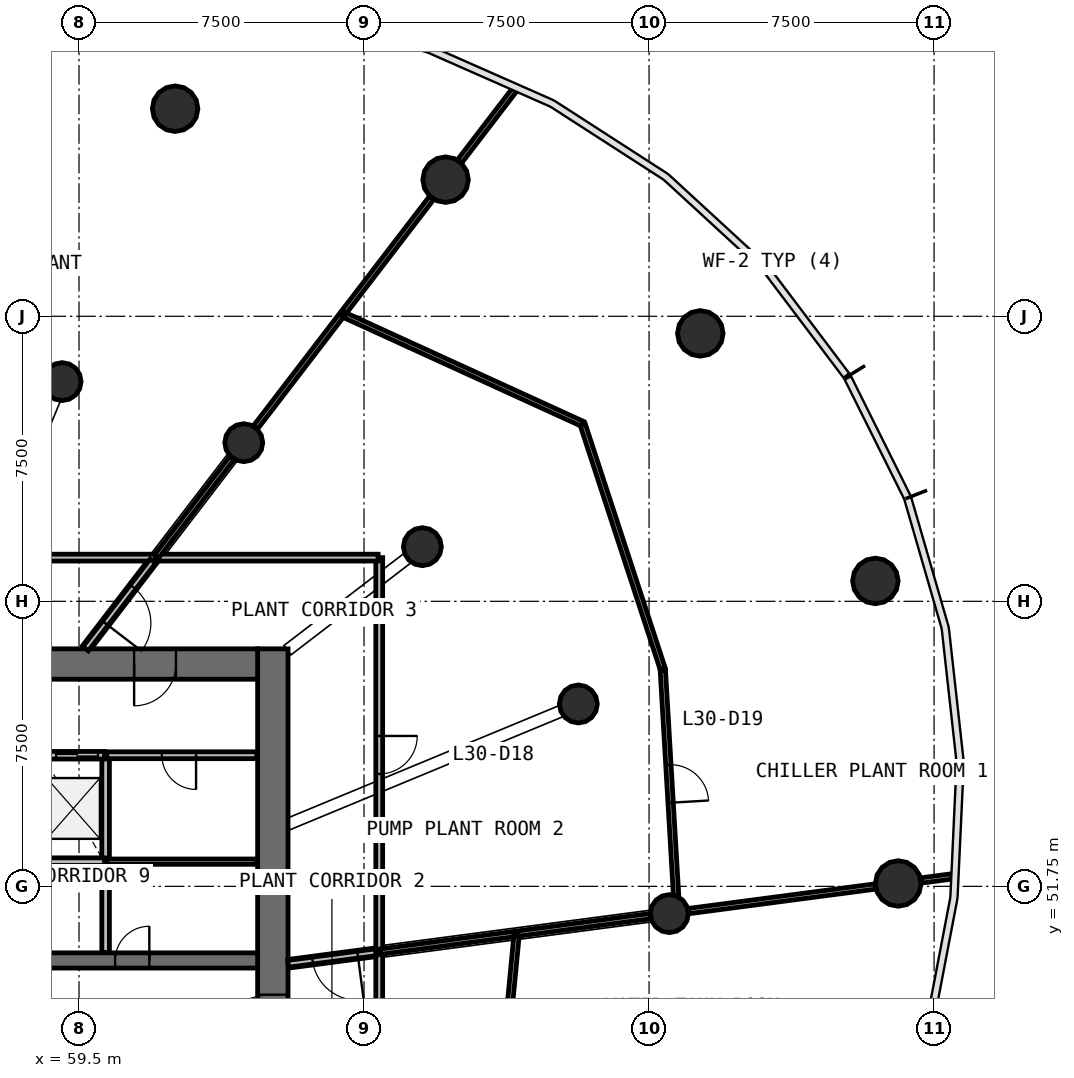
"""IFC4 building model, lengths in metres.
Left out: names, types, materials, properties, quantities, classifications, styles, units other than length and angle.
Written with IfcOpenShell. Run it as: python <this file> out.ifc"""

import sys

from ifc_helpers import new_model, si_unit, direction, frame, frame_2d, origin, origin_2d, place, context, subcontext, project, spatial, rectangle, circle, extrude, source, transform, mapped, element, fill, save


model = new_model("IFC4")
c1 = context("Model", 3, precision=1e-05, world=origin(), true_north=direction((0.0, 1.0)))
c2 = subcontext(c1, "Body", "Model", "MODEL_VIEW")
j1 = project(units=[si_unit("LENGTHUNIT", "METRE"), si_unit("PLANEANGLEUNIT", "RADIAN")], contexts=[c1])
p1 = place(None, origin())
s1 = spatial("IfcSite", under=j1, at=p1, CompositionType="ELEMENT")
p2 = place(p1, origin())
s2 = spatial("IfcBuilding", under=s1, at=p2, CompositionType="ELEMENT")
p3 = place(p2, frame((0.0, 0.0, 129.0)))
s3 = spatial("IfcBuildingStorey", under=s2, at=p3, CompositionType="ELEMENT", Elevation=129.0)
p4 = place(p3, frame((64.6, 38.0, 0.0), z_axis=(0.0, 0.0, 1.0), x_axis=(0.0, 1.0, 0.0)))
e1 = element("IfcWall", 1, at=p4, inside=s3, PredefinedType="SHEAR", context=c2, shape_type="SweptSolid", body=[
    extrude(rectangle(XDim=20.0, YDim=0.8, at=frame_2d((10.0, 0.0))), origin(), (0.0, 0.0, 1.0), 4.1),
])
p5 = place(p4, frame((9.1, 0.0, 0.0)))
e2 = element("IfcOpeningElement", 2, at=p5, cuts=e1, PredefinedType="OPENING", context=c2, shape_type="SweptSolid", body=[
    extrude(rectangle(XDim=1.8, YDim=2.1, at=frame_2d((0.9, 1.05))), frame((0.0, 0.41, 0.0), z_axis=(0.0, -1.0, 0.0), x_axis=(1.0, 0.0, 0.0)), (0.0, 0.0, 1.0), 0.82),
])
p6 = place(p3, frame((64.2, 57.6, 0.0), z_axis=(0.0, 0.0, 1.0), x_axis=(-1.0, 0.0, 0.0)))
e3 = element("IfcWall", 3, at=p6, inside=s3, PredefinedType="SHEAR", context=c2, shape_type="SweptSolid", body=[
    extrude(rectangle(XDim=24.4, YDim=0.8, at=frame_2d((12.2, 0.0))), origin(), (0.0, 0.0, 1.0), 4.1),
])
p7 = place(p6, frame((21.65, 0.0, 0.0)))
e4 = element("IfcOpeningElement", 4, at=p7, cuts=e3, PredefinedType="OPENING", context=c2, shape_type="SweptSolid", body=[
    extrude(rectangle(XDim=1.1, YDim=2.1, at=frame_2d((0.55, 1.05))), frame((0.0, 0.41, 0.0), z_axis=(0.0, -1.0, 0.0), x_axis=(1.0, 0.0, 0.0)), (0.0, 0.0, 1.0), 0.82),
])
p8 = place(p6, frame((2.15, 0.0, 0.0)))
e5 = element("IfcOpeningElement", 5, at=p8, cuts=e3, PredefinedType="OPENING", context=c2, shape_type="SweptSolid", body=[
    extrude(rectangle(XDim=1.1, YDim=2.1, at=frame_2d((0.55, 1.05))), frame((0.0, 0.41, 0.0), z_axis=(0.0, -1.0, 0.0), x_axis=(1.0, 0.0, 0.0)), (0.0, 0.0, 1.0), 0.82),
])
p9 = place(p3, frame((39.8, 49.8, 0.0), z_axis=(0.0, 0.0, 1.0), x_axis=(1.0, 0.0, 0.0)))
e6 = element("IfcWall", 6, at=p9, inside=s3, PredefinedType="SHEAR", context=c2, shape_type="SweptSolid", body=[
    extrude(rectangle(XDim=24.4, YDim=0.4, at=frame_2d((12.2, 0.0))), origin(), (0.0, 0.0, 1.0), 4.1),
])
p10 = place(p9, frame((1.1, 0.0, 0.0)))
e7 = element("IfcOpeningElement", 7, at=p10, cuts=e6, PredefinedType="OPENING", context=c2, shape_type="SweptSolid", body=[
    extrude(rectangle(XDim=1.8, YDim=2.4, at=frame_2d((0.9, 1.2))), frame((0.0, 0.21, 0.0), z_axis=(0.0, -1.0, 0.0), x_axis=(1.0, 0.0, 0.0)), (0.0, 0.0, 1.0), 0.42),
])
p11 = place(p9, frame((20.65, 0.0, 0.0)))
e8 = element("IfcOpeningElement", 8, at=p11, cuts=e6, PredefinedType="OPENING", context=c2, shape_type="SweptSolid", body=[
    extrude(rectangle(XDim=0.9, YDim=2.1, at=frame_2d((0.45, 1.05))), frame((0.0, 0.21, 0.0), z_axis=(0.0, -1.0, 0.0), x_axis=(1.0, 0.0, 0.0)), (0.0, 0.0, 1.0), 0.42),
])
p12 = place(p9, frame((11.85, 0.0, 0.0)))
e9 = element("IfcOpeningElement", 9, at=p12, cuts=e6, PredefinedType="OPENING", context=c2, shape_type="SweptSolid", body=[
    extrude(rectangle(XDim=0.9, YDim=2.1, at=frame_2d((0.45, 1.05))), frame((0.0, 0.21, 0.0), z_axis=(0.0, -1.0, 0.0), x_axis=(1.0, 0.0, 0.0)), (0.0, 0.0, 1.0), 0.42),
])
m1 = source(origin(), c2, "Body", "SweptSolid", [
    extrude(circle(Radius=0.6, at=origin_2d()), origin(), (0.0, 0.0, 1.0), 3.78),
])
for number, where, z_axis, x_axis in (
    (10, (81.056, 51.825, 0.0), (0.0, 0.0, 1.0), (1.0, 0.0, 0.0)),
    (11, (80.456, 59.787, 0.0), (0.0, 0.0, 1.0), (1.0, 0.0, 0.0)),
    (12, (75.848, 66.299, 0.0), (0.0, 0.0, 1.0), (1.0, 0.0, 0.0)),
    (13, (69.146, 70.345, 0.0), (0.0, 0.0, 1.0), (1.0, 0.0, 0.0)),
    (14, (62.029, 72.212, 0.0), (0.0, 0.0, 1.0), (1.0, 0.0, 0.0)),
):
    element("IfcColumn", number, at=place(p3, frame(where, z_axis=z_axis, x_axis=x_axis)), inside=s3, PredefinedType="COLUMN", context=c2, shape_type="MappedRepresentation", body=[
        mapped(m1, transform((0.0, 0.0, 0.0), scale=1.0)),
    ])
m2 = source(origin(), c2, "Body", "SweptSolid", [
    extrude(circle(Radius=0.5, at=origin_2d()), origin(), (0.0, 0.0, 1.0), 3.78),
])
for number, where, z_axis, x_axis in (
    (15, (75.034, 51.032, 0.0), (0.0, 0.0, 1.0), (1.0, 0.0, 0.0)),
    (16, (72.639, 56.549, 0.0), (0.0, 0.0, 1.0), (1.0, 0.0, 0.0)),
    (17, (68.535, 60.688, 0.0), (0.0, 0.0, 1.0), (1.0, 0.0, 0.0)),
    (18, (63.835, 63.424, 0.0), (0.0, 0.0, 1.0), (1.0, 0.0, 0.0)),
    (19, (59.055, 65.031, 0.0), (0.0, 0.0, 1.0), (1.0, 0.0, 0.0)),
):
    element("IfcColumn", number, at=place(p3, frame(where, z_axis=z_axis, x_axis=x_axis)), inside=s3, PredefinedType="COLUMN", context=c2, shape_type="MappedRepresentation", body=[
        mapped(m2, transform((0.0, 0.0, 0.0), scale=1.0)),
    ])
p13 = place(p3, frame((60.2, 52.4, 0.0), z_axis=(0.0, 0.0, 1.0), x_axis=(0.0, 1.0, 0.0)))
e20 = element("IfcWall", 20, at=p13, inside=s3, PredefinedType="SOLIDWALL", context=c2, shape_type="SweptSolid", body=[
    extrude(rectangle(XDim=2.8, YDim=0.2, at=frame_2d((1.4, 0.0))), origin(), (0.0, 0.0, 1.0), 3.78),
])
p14 = place(p3, frame((60.2, 50.01, 0.0), z_axis=(0.0, 0.0, 1.0), x_axis=(0.0, 1.0, 0.0)))
e21 = element("IfcWall", 21, at=p14, inside=s3, PredefinedType="SOLIDWALL", context=c2, shape_type="SweptSolid", body=[
    extrude(rectangle(XDim=2.36, YDim=0.2, at=frame_2d((1.18, 0.0))), origin(), (0.0, 0.0, 1.0), 3.78),
])
p15 = place(p3, frame((60.17, 52.4, 0.0), z_axis=(0.0, 0.0, 1.0), x_axis=(-1.0, 0.0, 0.0)))
e22 = element("IfcWall", 22, at=p15, inside=s3, PredefinedType="SOLIDWALL", context=c2, shape_type="SweptSolid", body=[
    extrude(rectangle(XDim=1.64, YDim=0.2, at=frame_2d((0.82, 0.0))), origin(), (0.0, 0.0, 1.0), 3.78),
])
p16 = place(p3, frame((60.17, 55.2, 0.0), z_axis=(0.0, 0.0, 1.0), x_axis=(-1.0, 0.0, 0.0)))
e23 = element("IfcWall", 23, at=p16, inside=s3, PredefinedType="SOLIDWALL", context=c2, shape_type="SweptSolid", body=[
    extrude(rectangle(XDim=1.64, YDim=0.2, at=frame_2d((0.82, 0.0))), origin(), (0.0, 0.0, 1.0), 3.78),
])
p17 = place(p16, frame((0.17, 0.0, 0.0)))
e24 = element("IfcOpeningElement", 24, at=p17, cuts=e23, PredefinedType="OPENING", context=c2, shape_type="SweptSolid", body=[
    extrude(rectangle(XDim=1.1, YDim=2.1, at=frame_2d((0.55, 1.05))), frame((0.0, 0.11, 0.0), z_axis=(0.0, -1.0, 0.0), x_axis=(1.0, 0.0, 0.0)), (0.0, 0.0, 1.0), 0.22),
])
p18 = place(p3, frame((67.4, 50.027, 0.0), z_axis=(0.0, 0.0, 1.0), x_axis=(0.0, -1.0, 0.0)))
e25 = element("IfcWall", 25, at=p18, inside=s3, PredefinedType="PARTITIONING", context=c2, shape_type="SweptSolid", body=[
    extrude(rectangle(XDim=13.24, YDim=0.18, at=frame_2d((6.62, 0.0))), origin(), (0.0, 0.0, 1.0), 2.58),
])
p19 = place(p18, frame((6.19, 0.0, 0.0)))
e26 = element("IfcOpeningElement", 26, at=p19, cuts=e25, PredefinedType="OPENING", context=c2, shape_type="SweptSolid", body=[
    extrude(rectangle(XDim=1.0, YDim=2.1, at=frame_2d((0.5, 1.05))), frame((0.0, 0.1, 0.0), z_axis=(0.0, -1.0, 0.0), x_axis=(1.0, 0.0, 0.0)), (0.0, 0.0, 1.0), 0.2),
])
p20 = place(p3, frame((50.397, 60.4, 0.0), z_axis=(0.0, 0.0, 1.0), x_axis=(1.0, 0.0, 0.0)))
e27 = element("IfcWall", 27, at=p20, inside=s3, PredefinedType="PARTITIONING", context=c2, shape_type="SweptSolid", body=[
    extrude(rectangle(XDim=11.117, YDim=0.18, at=frame_2d((5.559, 0.0))), origin(), (0.0, 0.0, 1.0), 2.58),
])
p21 = place(p20, frame((5.067, 0.0, 0.0)))
e28 = element("IfcOpeningElement", 28, at=p21, cuts=e27, PredefinedType="OPENING", context=c2, shape_type="SweptSolid", body=[
    extrude(rectangle(XDim=1.0, YDim=2.1, at=frame_2d((0.5, 1.05))), frame((0.0, 0.1, 0.0), z_axis=(0.0, -1.0, 0.0), x_axis=(1.0, 0.0, 0.0)), (0.0, 0.0, 1.0), 0.2),
])
p22 = place(p3, frame((67.4, 60.4, 0.0), z_axis=(0.0, 0.0, 1.0), x_axis=(0.0, -1.0, 0.0)))
e29 = element("IfcWall", 29, at=p22, inside=s3, PredefinedType="PARTITIONING", context=c2, shape_type="SweptSolid", body=[
    extrude(rectangle(XDim=10.343, YDim=0.18, at=frame_2d((5.171, 0.0))), origin(), (0.0, 0.0, 1.0), 2.58),
])
p23 = place(p22, frame((4.693, 0.0, 0.0)))
e30 = element("IfcOpeningElement", 30, at=p23, cuts=e29, PredefinedType="OPENING", context=c2, shape_type="SweptSolid", body=[
    extrude(rectangle(XDim=1.0, YDim=2.1, at=frame_2d((0.5, 1.05))), frame((0.0, 0.1, 0.0), z_axis=(0.0, -1.0, 0.0), x_axis=(1.0, 0.0, 0.0)), (0.0, 0.0, 1.0), 0.2),
])
p24 = place(p3, frame((67.37, 60.4, 0.0), z_axis=(0.0, 0.0, 1.0), x_axis=(-1.0, 0.0, 0.0)))
e31 = element("IfcWall", 31, at=p24, inside=s3, PredefinedType="PARTITIONING", context=c2, shape_type="SweptSolid", body=[
    extrude(rectangle(XDim=5.825, YDim=0.18, at=frame_2d((2.913, 0.0))), origin(), (0.0, 0.0, 1.0), 2.58),
])
p25 = place(p3, frame((64.18, 55.2, 0.0), z_axis=(0.0, 0.0, 1.0), x_axis=(-1.0, 0.0, 0.0)))
e32 = element("IfcWall", 32, at=p25, inside=s3, PredefinedType="PARTITIONING", context=c2, shape_type="SweptSolid", body=[
    extrude(rectangle(XDim=3.95, YDim=0.18, at=frame_2d((1.975, 0.0))), origin(), (0.0, 0.0, 1.0), 3.78),
])
p26 = place(p25, frame((1.6, 0.0, 0.0)))
e33 = element("IfcOpeningElement", 33, at=p26, cuts=e32, PredefinedType="OPENING", context=c2, shape_type="SweptSolid", body=[
    extrude(rectangle(XDim=0.9, YDim=2.1, at=frame_2d((0.45, 1.05))), frame((0.0, 0.1, 0.0), z_axis=(0.0, -1.0, 0.0), x_axis=(1.0, 0.0, 0.0)), (0.0, 0.0, 1.0), 0.2),
])
p27 = place(p3, frame((61.446, 60.31, 0.0), z_axis=(0.0, 0.0, 1.0), x_axis=(-0.608737787706, -0.793371480341, 0.0)))
e34 = element("IfcWall", 34, at=p27, inside=s3, PredefinedType="PARTITIONING", context=c2, shape_type="SweptSolid", body=[
    extrude(rectangle(XDim=2.912, YDim=0.18, at=frame_2d((1.456, 0.0))), origin(), (0.0, 0.0, 1.0), 2.58),
])
p28 = place(p27, frame((0.862, 0.0, 0.0)))
e35 = element("IfcOpeningElement", 35, at=p28, cuts=e34, PredefinedType="OPENING", context=c2, shape_type="SweptSolid", body=[
    extrude(rectangle(XDim=1.2, YDim=2.1, at=frame_2d((0.6, 1.05))), frame((0.0, 0.1, 0.0), z_axis=(0.0, -1.0, 0.0), x_axis=(1.0, 0.0, 0.0)), (0.0, 0.0, 1.0), 0.2),
])
p29 = place(p3, frame((67.31, 50.016, 0.0), z_axis=(0.0, 0.0, 1.0), x_axis=(-0.991440737811, -0.130557509967, 0.0)))
e36 = element("IfcWall", 36, at=p29, inside=s3, PredefinedType="PARTITIONING", context=c2, shape_type="SweptSolid", body=[
    extrude(rectangle(XDim=2.33, YDim=0.18, at=frame_2d((1.165, 0.0))), origin(), (0.0, 0.0, 1.0), 2.58),
])
p30 = place(p29, frame((0.48, 0.0, 0.0)))
e37 = element("IfcOpeningElement", 37, at=p30, cuts=e36, PredefinedType="OPENING", context=c2, shape_type="SweptSolid", body=[
    extrude(rectangle(XDim=1.2, YDim=2.1, at=frame_2d((0.6, 1.05))), frame((0.0, 0.1, 0.0), z_axis=(0.0, -1.0, 0.0), x_axis=(1.0, 0.0, 0.0)), (0.0, 0.0, 1.0), 0.2),
])
p31 = place(p3, frame((72.748, 63.92, 0.0), z_axis=(0.0, 0.0, 1.0), x_axis=(-0.909542442832, 0.415611049765, 0.0)))
e38 = element("IfcWall", 38, at=p31, inside=s3, PredefinedType="PARTITIONING", context=c2, shape_type="SweptSolid", body=[
    extrude(rectangle(XDim=6.945, YDim=0.14, at=frame_2d((3.473, 0.0))), origin(), (0.0, 0.0, 1.0), 2.58),
])
p32 = place(p3, frame((74.86, 57.469, 0.0), z_axis=(0.0, 0.0, 1.0), x_axis=(-0.311205759701, 0.950342556728, 0.0)))
e39 = element("IfcWall", 39, at=p32, inside=s3, PredefinedType="PARTITIONING", context=c2, shape_type="SweptSolid", body=[
    extrude(rectangle(XDim=6.759, YDim=0.14, at=frame_2d((3.379, 0.0))), origin(), (0.0, 0.0, 1.0), 2.58),
])
p33 = place(p3, frame((74.862, 57.439, 0.0), z_axis=(0.0, 0.0, 1.0), x_axis=(0.058847201185, -0.998267001815, 0.0)))
e40 = element("IfcWall", 40, at=p33, inside=s3, PredefinedType="PARTITIONING", context=c2, shape_type="SweptSolid", body=[
    extrude(rectangle(XDim=5.945, YDim=0.14, at=frame_2d((2.973, 0.0))), origin(), (0.0, 0.0, 1.0), 2.58),
])
p34 = place(p33, frame((2.495, 0.0, 0.0)))
e41 = element("IfcOpeningElement", 41, at=p34, cuts=e40, PredefinedType="OPENING", context=c2, shape_type="SweptSolid", body=[
    extrude(rectangle(XDim=1.0, YDim=2.1, at=frame_2d((0.5, 1.05))), frame((0.0, 0.08, 0.0), z_axis=(0.0, -1.0, 0.0), x_axis=(1.0, 0.0, 0.0)), (0.0, 0.0, 1.0), 0.16),
])
p35 = place(p3, frame((70.542, 45.559, 0.0), z_axis=(0.0, 0.0, 1.0), x_axis=(0.095688058523, 0.995411369965, 0.0)))
e42 = element("IfcWall", 42, at=p35, inside=s3, PredefinedType="PARTITIONING", context=c2, shape_type="SweptSolid", body=[
    extrude(rectangle(XDim=4.968, YDim=0.14, at=frame_2d((2.484, 0.0))), origin(), (0.0, 0.0, 1.0), 2.58),
])
p36 = place(p3, frame((75.534, 51.098, 0.0), z_axis=(0.0, 0.0, 1.0), x_axis=(0.991443414541, 0.130537181533, 0.0)))
e43 = element("IfcWall", 43, at=p36, inside=s3, PredefinedType="PARTITIONING", context=c2, shape_type="SweptSolid", body=[
    extrude(rectangle(XDim=4.966, YDim=0.14, at=frame_2d((2.483, 0.0))), origin(), (0.0, 0.0, 1.0), 2.58),
])
p37 = place(p3, frame((64.18, 52.4, 0.0), z_axis=(0.0, 0.0, 1.0), x_axis=(-1.0, 0.0, 0.0)))
e44 = element("IfcWall", 44, at=p37, inside=s3, PredefinedType="PARTITIONING", context=c2, shape_type="SweptSolid", body=[
    extrude(rectangle(XDim=3.95, YDim=0.14, at=frame_2d((1.975, 0.0))), origin(), (0.0, 0.0, 1.0), 2.98),
])
p38 = place(p3, frame((66.475, 66.864, 0.0), z_axis=(0.0, 0.0, 1.0), x_axis=(0.608749841057, 0.793362231905, 0.0)))
e45 = element("IfcWall", 45, at=p38, inside=s3, PredefinedType="PARTITIONING", context=c2, shape_type="SweptSolid", body=[
    extrude(rectangle(XDim=3.783, YDim=0.14, at=frame_2d((1.892, 0.0))), origin(), (0.0, 0.0, 1.0), 2.58),
])
p39 = place(p3, frame((64.142, 63.824, 0.0), z_axis=(0.0, 0.0, 1.0), x_axis=(0.608761301523, 0.793353438114, 0.0)))
e46 = element("IfcWall", 46, at=p39, inside=s3, PredefinedType="PARTITIONING", context=c2, shape_type="SweptSolid", body=[
    extrude(rectangle(XDim=3.73, YDim=0.14, at=frame_2d((1.865, 0.0))), origin(), (0.0, 0.0, 1.0), 2.58),
])
p40 = place(p3, frame((67.43, 50.031, 0.0), z_axis=(0.0, 0.0, 1.0), x_axis=(0.991447734454, 0.130504367157, 0.0)))
e47 = element("IfcWall", 47, at=p40, inside=s3, PredefinedType="PARTITIONING", context=c2, shape_type="SweptSolid", body=[
    extrude(rectangle(XDim=3.547, YDim=0.14, at=frame_2d((1.773, 0.0))), origin(), (0.0, 0.0, 1.0), 2.58),
])
p41 = place(p3, frame((71.047, 50.508, 0.0), z_axis=(0.0, 0.0, 1.0), x_axis=(0.991446023146, 0.130517367377, 0.0)))
e48 = element("IfcWall", 48, at=p41, inside=s3, PredefinedType="PARTITIONING", context=c2, shape_type="SweptSolid", body=[
    extrude(rectangle(XDim=3.517, YDim=0.14, at=frame_2d((1.758, 0.0))), origin(), (0.0, 0.0, 1.0), 2.58),
])
p42 = place(p3, frame((61.537, 60.429, 0.0), z_axis=(0.0, 0.0, 1.0), x_axis=(0.608754323654, 0.793358792371, 0.0)))
e49 = element("IfcWall", 49, at=p42, inside=s3, PredefinedType="PARTITIONING", context=c2, shape_type="SweptSolid", body=[
    extrude(rectangle(XDim=3.271, YDim=0.14, at=frame_2d((1.635, 0.0))), origin(), (0.0, 0.0, 1.0), 2.58),
])
p43 = place(p3, frame((69.514, 70.824, 0.0), z_axis=(0.0, 0.0, 1.0), x_axis=(0.608723111947, 0.793382740537, 0.0)))
e50 = element("IfcWall", 50, at=p43, inside=s3, PredefinedType="PARTITIONING", context=c2, shape_type="SweptSolid", body=[
    extrude(rectangle(XDim=2.39, YDim=0.14, at=frame_2d((1.195, 0.0))), origin(), (0.0, 0.0, 1.0), 2.98),
])
p44 = place(p3, frame((81.656, 51.904, 0.0), z_axis=(0.0, 0.0, 1.0), x_axis=(0.991436143334, 0.130592395224, 0.0)))
e51 = element("IfcWall", 51, at=p44, inside=s3, PredefinedType="PARTITIONING", context=c2, shape_type="SweptSolid", body=[
    extrude(rectangle(XDim=0.824, YDim=0.14, at=frame_2d((0.412, 0.0))), origin(), (0.0, 0.0, 1.0), 2.98),
])
m3 = source(origin(), c2, "Body", "SweptSolid", [
    extrude(rectangle(XDim=1.8, YDim=2.1, at=frame_2d((0.9, 1.05))), frame((0.0, 0.025, 0.0), z_axis=(0.0, -1.0, 0.0), x_axis=(1.0, 0.0, 0.0)), (0.0, 0.0, 1.0), 0.05),
])
p45 = place(p5, origin())
e52 = element("IfcDoor", 52, at=p45, inside=s3, OperationType="SINGLE_SWING_LEFT", PredefinedType="DOOR", context=c2, shape_type="MappedRepresentation", body=[
    mapped(m3, transform((0.0, 0.0, 0.0), scale=1.0)),
])
fill(e2, e52)
m4 = source(origin(), c2, "Body", "SweptSolid", [
    extrude(rectangle(XDim=1.1, YDim=2.1, at=frame_2d((0.55, 1.05))), frame((0.0, 0.025, 0.0), z_axis=(0.0, -1.0, 0.0), x_axis=(1.0, 0.0, 0.0)), (0.0, 0.0, 1.0), 0.05),
])
p46 = place(p17, origin())
e53 = element("IfcDoor", 53, at=p46, inside=s3, OperationType="DOUBLE_DOOR_SLIDING", PredefinedType="USERDEFINED", context=c2, shape_type="MappedRepresentation", body=[
    mapped(m4, transform((0.0, 0.0, 0.0), scale=1.0)),
])
fill(e24, e53)
m5 = source(origin(), c2, "Body", "SweptSolid", [
    extrude(rectangle(XDim=1.1, YDim=2.1, at=frame_2d((0.55, 1.05))), frame((0.0, 0.025, 0.0), z_axis=(0.0, -1.0, 0.0), x_axis=(1.0, 0.0, 0.0)), (0.0, 0.0, 1.0), 0.05),
])
p47 = place(p8, origin())
e54 = element("IfcDoor", 54, at=p47, inside=s3, OperationType="SINGLE_SWING_RIGHT", PredefinedType="DOOR", context=c2, shape_type="MappedRepresentation", body=[
    mapped(m5, transform((0.0, 0.0, 0.0), scale=1.0)),
])
fill(e5, e54)
m6 = source(origin(), c2, "Body", "SweptSolid", [
    extrude(rectangle(XDim=1.0, YDim=2.1, at=frame_2d((0.5, 1.05))), frame((0.0, 0.025, 0.0), z_axis=(0.0, -1.0, 0.0), x_axis=(1.0, 0.0, 0.0)), (0.0, 0.0, 1.0), 0.05),
])
p48 = place(p23, origin())
e55 = element("IfcDoor", 55, at=p48, inside=s3, OperationType="SINGLE_SWING_LEFT", PredefinedType="DOOR", context=c2, shape_type="MappedRepresentation", body=[
    mapped(m6, transform((0.0, 0.0, 0.0), scale=1.0)),
])
fill(e30, e55)
p49 = place(p34, origin())
e56 = element("IfcDoor", 56, at=p49, inside=s3, OperationType="SINGLE_SWING_RIGHT", PredefinedType="DOOR", context=c2, shape_type="MappedRepresentation", body=[
    mapped(m6, transform((0.0, 0.0, 0.0), scale=1.0)),
])
fill(e41, e56)
m7 = source(origin(), c2, "Body", "SweptSolid", [
    extrude(rectangle(XDim=1.2, YDim=2.1, at=frame_2d((0.6, 1.05))), frame((0.0, 0.025, 0.0), z_axis=(0.0, -1.0, 0.0), x_axis=(1.0, 0.0, 0.0)), (0.0, 0.0, 1.0), 0.05),
])
p50 = place(p28, origin())
e57 = element("IfcDoor", 57, at=p50, inside=s3, OperationType="SINGLE_SWING_RIGHT", PredefinedType="DOOR", context=c2, shape_type="MappedRepresentation", body=[
    mapped(m7, transform((0.0, 0.0, 0.0), scale=1.0)),
])
fill(e35, e57)
p51 = place(p30, origin())
e58 = element("IfcDoor", 58, at=p51, inside=s3, OperationType="SINGLE_SWING_LEFT", PredefinedType="DOOR", context=c2, shape_type="MappedRepresentation", body=[
    mapped(m7, transform((0.0, 0.0, 0.0), scale=1.0)),
])
fill(e37, e58)
m8 = source(origin(), c2, "Body", "SweptSolid", [
    extrude(rectangle(XDim=0.9, YDim=2.1, at=frame_2d((0.45, 1.05))), frame((0.0, 0.025, 0.0), z_axis=(0.0, -1.0, 0.0), x_axis=(1.0, 0.0, 0.0)), (0.0, 0.0, 1.0), 0.05),
])
p52 = place(p11, origin())
e59 = element("IfcDoor", 59, at=p52, inside=s3, OperationType="SINGLE_SWING_RIGHT", PredefinedType="DOOR", context=c2, shape_type="MappedRepresentation", body=[
    mapped(m8, transform((0.0, 0.0, 0.0), scale=1.0)),
])
fill(e8, e59)
p53 = place(p26, origin())
e60 = element("IfcDoor", 60, at=p53, inside=s3, OperationType="SINGLE_SWING_LEFT", PredefinedType="DOOR", context=c2, shape_type="MappedRepresentation", body=[
    mapped(m8, transform((0.0, 0.0, 0.0), scale=1.0)),
])
fill(e33, e60)
save(model, sys.argv[1])
